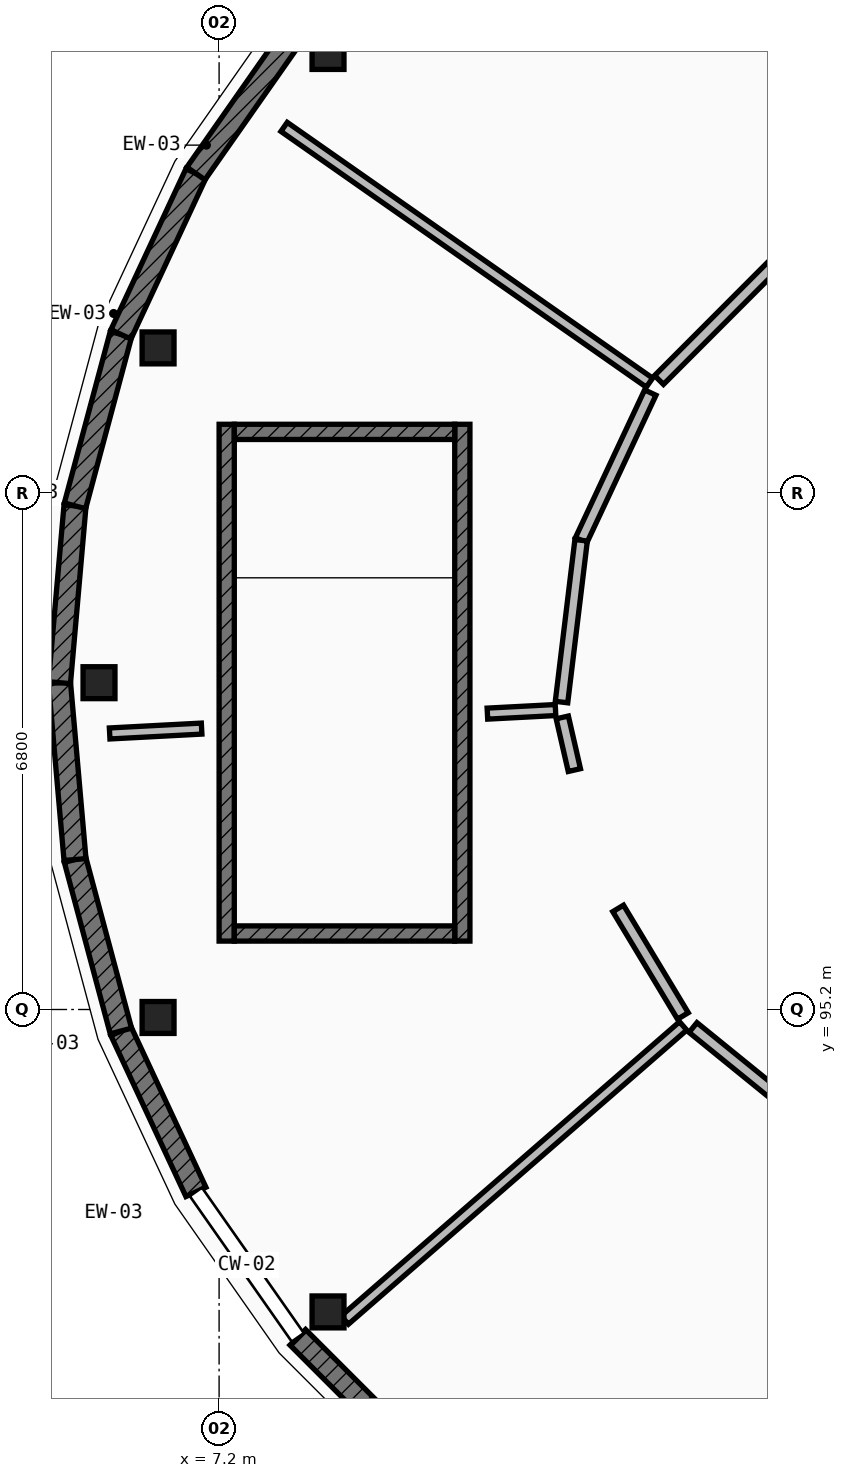
"""IFC4 building model, lengths in metres.
Left out: names, types, materials, properties, quantities, classifications, styles, units other than length and angle.
Written with IfcOpenShell. Run it as: python <this file> out.ifc"""

import sys

from ifc_helpers import new_model, si_unit, direction, frame, frame_2d, origin, origin_2d, place, context, subcontext, project, spatial, rectangle, extrude, element, fill, save


model = new_model("IFC4")
c1 = context("Model", 3, precision=1e-05, world=origin(), true_north=direction((0.0, 1.0)))
c2 = subcontext(c1, "Body", "Model", "MODEL_VIEW")
j1 = project(units=[si_unit("LENGTHUNIT", "METRE"), si_unit("PLANEANGLEUNIT", "RADIAN")], contexts=[c1])
p1 = place(None, origin())
s1 = spatial("IfcSite", under=j1, at=p1, CompositionType="ELEMENT")
p2 = place(p1, origin())
s2 = spatial("IfcBuilding", under=s1, at=p2, CompositionType="ELEMENT")
p3 = place(p2, frame((0.0, 0.0, 4.55)))
s3 = spatial("IfcBuildingStorey", under=s2, at=p3, CompositionType="ELEMENT", Elevation=4.55)
for number, where, z_axis, x_axis in (
    (1, (8.633, 107.779, 0.0), (0.0, 0.0, 1.0), (1.0, 0.0, 0.0)),
    (2, (6.397, 103.905, 0.0), (0.0, 0.0, 1.0), (1.0, 0.0, 0.0)),
    (3, (5.62, 99.5, 0.0), (0.0, 0.0, 1.0), (1.0, 0.0, 0.0)),
    (4, (6.397, 95.095, 0.0), (0.0, 0.0, 1.0), (1.0, 0.0, 0.0)),
    (5, (8.633, 91.221, 0.0), (0.0, 0.0, 1.0), (1.0, 0.0, 0.0)),
):
    element("IfcColumn", number, at=place(p3, frame(where, z_axis=z_axis, x_axis=x_axis)), inside=s3, PredefinedType="COLUMN", context=c2, shape_type="SweptSolid", body=[
        extrude(rectangle(XDim=0.42, YDim=0.42, at=origin_2d()), origin(), (0.0, 0.0, 1.0), 4.2),
    ])
p4 = place(p3, frame((9.887, 89.235, 0.0), z_axis=(0.0, 0.0, 1.0), x_axis=(-0.707106781187, 0.707106781187, 0.0)))
e6 = element("IfcWall", 6, at=p4, inside=s3, PredefinedType="ELEMENTEDWALL", context=c2, shape_type="SweptSolid", body=[
    extrude(rectangle(XDim=2.336, YDim=0.29, at=frame_2d((1.168, 0.0))), origin(), (0.0, 0.0, 1.0), 3.309),
])
p5 = place(p4, frame((0.528, 0.0, 0.85)))
e7 = element("IfcOpeningElement", 7, at=p5, cuts=e6, PredefinedType="OPENING", context=c2, shape_type="SweptSolid", body=[
    extrude(rectangle(XDim=1.28, YDim=1.65, at=frame_2d((0.64, 0.825))), frame((0.0, 0.155, 0.0), z_axis=(0.0, -1.0, 0.0), x_axis=(1.0, 0.0, 0.0)), (0.0, 0.0, 1.0), 0.31),
])
p6 = place(p3, frame((6.895, 92.8, 0.0), z_axis=(0.0, 0.0, 1.0), x_axis=(-0.422587894318, 0.906321946979, 0.0)))
e8 = element("IfcWall", 8, at=p6, inside=s3, PredefinedType="ELEMENTEDWALL", context=c2, shape_type="SweptSolid", body=[
    extrude(rectangle(XDim=2.336, YDim=0.29, at=frame_2d((1.168, 0.0))), origin(), (0.0, 0.0, 1.0), 3.309),
])
p7 = place(p6, frame((0.518, 0.0, 0.85)))
e9 = element("IfcOpeningElement", 9, at=p7, cuts=e8, PredefinedType="OPENING", context=c2, shape_type="SweptSolid", body=[
    extrude(rectangle(XDim=1.3, YDim=1.4, at=frame_2d((0.65, 0.7))), frame((0.0, 0.155, 0.0), z_axis=(0.0, -1.0, 0.0), x_axis=(1.0, 0.0, 0.0)), (0.0, 0.0, 1.0), 0.31),
])
p8 = place(p3, frame((5.908, 94.917, 0.0), z_axis=(0.0, 0.0, 1.0), x_axis=(-0.258612423585, 0.965981166673, 0.0)))
e10 = element("IfcWall", 10, at=p8, inside=s3, PredefinedType="ELEMENTEDWALL", context=c2, shape_type="SweptSolid", body=[
    extrude(rectangle(XDim=2.335, YDim=0.29, at=frame_2d((1.168, 0.0))), origin(), (0.0, 0.0, 1.0), 3.309),
])
p9 = place(p8, frame((0.518, 0.0, 0.85)))
e11 = element("IfcOpeningElement", 11, at=p9, cuts=e10, PredefinedType="OPENING", context=c2, shape_type="SweptSolid", body=[
    extrude(rectangle(XDim=1.3, YDim=1.7, at=frame_2d((0.65, 0.85))), frame((0.0, 0.155, 0.0), z_axis=(0.0, -1.0, 0.0), x_axis=(1.0, 0.0, 0.0)), (0.0, 0.0, 1.0), 0.31),
])
for number, where, z_axis, x_axis in (
    (12, (5.304, 97.173, 0.0), (0.0, 0.0, 1.0), (-0.087, 0.996, 0.0)),
    (13, (5.1, 99.5, 0.0), (0.0, 0.0, 1.0), (0.087, 0.996, 0.0)),
):
    element("IfcWall", number, at=place(p3, frame(where, z_axis=z_axis, x_axis=x_axis)), inside=s3, PredefinedType="ELEMENTEDWALL", context=c2, shape_type="SweptSolid", body=[
        extrude(rectangle(XDim=2.336, YDim=0.29, at=frame_2d((1.168, 0.0))), origin(), (0.0, 0.0, 1.0), 3.309),
    ])
p10 = place(p3, frame((5.304, 101.827, 0.0), z_axis=(0.0, 0.0, 1.0), x_axis=(0.258612423585, 0.965981166673, 0.0)))
e14 = element("IfcWall", 14, at=p10, inside=s3, PredefinedType="ELEMENTEDWALL", context=c2, shape_type="SweptSolid", body=[
    extrude(rectangle(XDim=2.335, YDim=0.29, at=frame_2d((1.168, 0.0))), origin(), (0.0, 0.0, 1.0), 3.309),
])
p11 = place(p10, frame((0.518, 0.0, 0.85)))
e15 = element("IfcOpeningElement", 15, at=p11, cuts=e14, PredefinedType="OPENING", context=c2, shape_type="SweptSolid", body=[
    extrude(rectangle(XDim=1.3, YDim=2.0, at=frame_2d((0.65, 1.0))), frame((0.0, 0.155, 0.0), z_axis=(0.0, -1.0, 0.0), x_axis=(1.0, 0.0, 0.0)), (0.0, 0.0, 1.0), 0.31),
])
p12 = place(p3, frame((5.908, 104.083, 0.0), z_axis=(0.0, 0.0, 1.0), x_axis=(0.422587894318, 0.906321946979, 0.0)))
e16 = element("IfcWall", 16, at=p12, inside=s3, PredefinedType="ELEMENTEDWALL", context=c2, shape_type="SweptSolid", body=[
    extrude(rectangle(XDim=2.336, YDim=0.29, at=frame_2d((1.168, 0.0))), origin(), (0.0, 0.0, 1.0), 3.309),
])
p13 = place(p12, frame((0.518, 0.0, 0.7)))
e17 = element("IfcOpeningElement", 17, at=p13, cuts=e16, PredefinedType="OPENING", context=c2, shape_type="SweptSolid", body=[
    extrude(rectangle(XDim=1.3, YDim=2.3, at=frame_2d((0.65, 1.15))), frame((0.0, 0.155, 0.0), z_axis=(0.0, -1.0, 0.0), x_axis=(1.0, 0.0, 0.0)), (0.0, 0.0, 1.0), 0.31),
])
p14 = place(p3, frame((6.895, 106.2, 0.0), z_axis=(0.0, 0.0, 1.0), x_axis=(0.573728883722, 0.819045278347, 0.0)))
e18 = element("IfcWall", 18, at=p14, inside=s3, PredefinedType="ELEMENTEDWALL", context=c2, shape_type="SweptSolid", body=[
    extrude(rectangle(XDim=2.336, YDim=0.29, at=frame_2d((1.168, 0.0))), origin(), (0.0, 0.0, 1.0), 3.309),
])
p15 = place(p14, frame((0.508, 0.0, 0.85)))
e19 = element("IfcOpeningElement", 19, at=p15, cuts=e18, PredefinedType="OPENING", context=c2, shape_type="SweptSolid", body=[
    extrude(rectangle(XDim=1.32, YDim=1.55, at=frame_2d((0.66, 0.775))), frame((0.0, 0.155, 0.0), z_axis=(0.0, -1.0, 0.0), x_axis=(1.0, 0.0, 0.0)), (0.0, 0.0, 1.0), 0.31),
])
p16 = place(p3, frame((10.4, 96.1, 0.0), z_axis=(0.0, 0.0, 1.0), x_axis=(0.0, 1.0, 0.0)))
e20 = element("IfcWall", 20, at=p16, inside=s3, PredefinedType="SHEAR", context=c2, shape_type="SweptSolid", body=[
    extrude(rectangle(XDim=6.8, YDim=0.2, at=frame_2d((3.4, 0.0))), origin(), (0.0, 0.0, 1.0), 3.955),
])
p17 = place(p16, frame((0.38, 0.0, 0.0)))
e21 = element("IfcOpeningElement", 21, at=p17, cuts=e20, PredefinedType="OPENING", context=c2, shape_type="SweptSolid", body=[
    extrude(rectangle(XDim=1.05, YDim=2.15, at=frame_2d((0.525, 1.075))), frame((0.0, 0.11, 0.0), z_axis=(0.0, -1.0, 0.0), x_axis=(1.0, 0.0, 0.0)), (0.0, 0.0, 1.0), 0.22),
])
p18 = place(p3, frame((7.3, 96.1, 0.0), z_axis=(0.0, 0.0, 1.0), x_axis=(0.0, 1.0, 0.0)))
e22 = element("IfcWall", 22, at=p18, inside=s3, PredefinedType="SHEAR", context=c2, shape_type="SweptSolid", body=[
    extrude(rectangle(XDim=6.8, YDim=0.2, at=frame_2d((3.4, 0.0))), origin(), (0.0, 0.0, 1.0), 3.955),
])
for number, where, z_axis, x_axis in (
    (23, (10.3, 96.2, 0.0), (0.0, 0.0, 1.0), (-1.0, 0.0, 0.0)),
    (24, (10.3, 102.8, 0.0), (0.0, 0.0, 1.0), (-1.0, 0.0, 0.0)),
):
    element("IfcWall", number, at=place(p3, frame(where, z_axis=z_axis, x_axis=x_axis)), inside=s3, PredefinedType="SHEAR", context=c2, shape_type="SweptSolid", body=[
        extrude(rectangle(XDim=2.9, YDim=0.2, at=frame_2d((1.45, 0.0))), origin(), (0.0, 0.0, 1.0), 3.955),
    ])
p19 = place(p3, frame((12.862, 103.448, 0.0), z_axis=(0.0, 0.0, 1.0), x_axis=(-0.819231920519, 0.573462344363, 0.0)))
e25 = element("IfcWall", 25, at=p19, inside=s3, PredefinedType="PARTITIONING", context=c2, shape_type="SweptSolid", body=[
    extrude(rectangle(XDim=5.868, YDim=0.145, at=frame_2d((2.934, 0.0))), origin(), (0.0, 0.0, 1.0), 3.284),
])
p20 = place(p3, frame((11.626, 99.14, 0.0), z_axis=(0.0, 0.0, 1.0), x_axis=(-0.998634316819, -0.052244629109, 0.0)))
e26 = element("IfcWall", 26, at=p20, inside=s3, PredefinedType="PARTITIONING", context=c2, shape_type="SweptSolid", body=[
    extrude(rectangle(XDim=0.897, YDim=0.145, at=frame_2d((0.449, 0.0))), origin(), (0.0, 0.0, 1.0), 3.284),
])
p21 = place(p3, frame((6.97, 98.896, 0.0), z_axis=(0.0, 0.0, 1.0), x_axis=(-0.998605556721, -0.05279149634, 0.0)))
e27 = element("IfcWall", 27, at=p21, inside=s3, PredefinedType="PARTITIONING", context=c2, shape_type="SweptSolid", body=[
    extrude(rectangle(XDim=1.212, YDim=0.145, at=frame_2d((0.606, 0.0))), origin(), (0.0, 0.0, 1.0), 3.284),
])
p22 = place(p3, frame((13.305, 94.984, 0.0), z_axis=(0.0, 0.0, 1.0), x_axis=(-0.754647404393, -0.656130547256, 0.0)))
e28 = element("IfcWall", 28, at=p22, inside=s3, PredefinedType="PARTITIONING", context=c2, shape_type="SweptSolid", body=[
    extrude(rectangle(XDim=5.898, YDim=0.145, at=frame_2d((2.949, 0.0))), origin(), (0.0, 0.0, 1.0), 3.284),
])
p23 = place(p3, frame((14.503, 105.001, 0.0), z_axis=(0.0, 0.0, 1.0), x_axis=(-0.706366445294, -0.707846342762, 0.0)))
e29 = element("IfcWall", 29, at=p23, inside=s3, PredefinedType="PARTITIONING", context=c2, shape_type="SweptSolid", body=[
    extrude(rectangle(XDim=2.145, YDim=0.165, at=frame_2d((1.072, 0.0))), origin(), (0.0, 0.0, 1.0), 3.284),
])
p24 = place(p23, frame((0.588, 0.0, 0.0)))
e30 = element("IfcOpeningElement", 30, at=p24, cuts=e29, PredefinedType="OPENING", context=c2, shape_type="SweptSolid", body=[
    extrude(rectangle(XDim=0.97, YDim=2.2, at=frame_2d((0.485, 1.1))), frame((0.0, 0.093, 0.0), z_axis=(0.0, -1.0, 0.0), x_axis=(1.0, 0.0, 0.0)), (0.0, 0.0, 1.0), 0.185),
])
p25 = place(p3, frame((12.873, 103.317, 0.0), z_axis=(0.0, 0.0, 1.0), x_axis=(-0.424218123239, -0.905560038824, 0.0)))
e31 = element("IfcWall", 31, at=p25, inside=s3, PredefinedType="PARTITIONING", context=c2, shape_type="SweptSolid", body=[
    extrude(rectangle(XDim=2.146, YDim=0.165, at=frame_2d((1.073, 0.0))), origin(), (0.0, 0.0, 1.0), 3.284),
])
p26 = place(p25, frame((0.578, 0.0, 0.0)))
e32 = element("IfcOpeningElement", 32, at=p26, cuts=e31, PredefinedType="OPENING", context=c2, shape_type="SweptSolid", body=[
    extrude(rectangle(XDim=0.99, YDim=2.22, at=frame_2d((0.495, 1.11))), frame((0.0, 0.093, 0.0), z_axis=(0.0, -1.0, 0.0), x_axis=(1.0, 0.0, 0.0)), (0.0, 0.0, 1.0), 0.185),
])
p27 = place(p3, frame((11.963, 101.374, 0.0), z_axis=(0.0, 0.0, 1.0), x_axis=(-0.120222568092, -0.992746963794, 0.0)))
e33 = element("IfcWall", 33, at=p27, inside=s3, PredefinedType="PARTITIONING", context=c2, shape_type="SweptSolid", body=[
    extrude(rectangle(XDim=2.145, YDim=0.165, at=frame_2d((1.072, 0.0))), origin(), (0.0, 0.0, 1.0), 3.284),
])
p28 = place(p3, frame((11.715, 99.043, 0.0), z_axis=(0.0, 0.0, 1.0), x_axis=(0.223580091663, -0.974685560892, 0.0)))
e34 = element("IfcWall", 34, at=p28, inside=s3, PredefinedType="PARTITIONING", context=c2, shape_type="SweptSolid", body=[
    extrude(rectangle(XDim=0.711, YDim=0.165, at=frame_2d((0.355, 0.0))), origin(), (0.0, 0.0, 1.0), 3.284),
])
p29 = place(p3, frame((12.45, 96.53, 0.0), z_axis=(0.0, 0.0, 1.0), x_axis=(0.515842762515, -0.856683281243, 0.0)))
e35 = element("IfcWall", 35, at=p29, inside=s3, PredefinedType="PARTITIONING", context=c2, shape_type="SweptSolid", body=[
    extrude(rectangle(XDim=1.652, YDim=0.165, at=frame_2d((0.826, 0.0))), origin(), (0.0, 0.0, 1.0), 3.284),
])
p30 = place(p29, frame((0.321, 0.0, 0.0)))
e36 = element("IfcOpeningElement", 36, at=p30, cuts=e35, PredefinedType="OPENING", context=c2, shape_type="SweptSolid", body=[
    extrude(rectangle(XDim=1.01, YDim=2.15, at=frame_2d((0.505, 1.075))), frame((0.0, 0.093, 0.0), z_axis=(0.0, -1.0, 0.0), x_axis=(1.0, 0.0, 0.0)), (0.0, 0.0, 1.0), 0.185),
])
p31 = place(p3, frame((13.435, 94.963, 0.0), z_axis=(0.0, 0.0, 1.0), x_axis=(0.776454505021, -0.63017331079, 0.0)))
e37 = element("IfcWall", 37, at=p31, inside=s3, PredefinedType="PARTITIONING", context=c2, shape_type="SweptSolid", body=[
    extrude(rectangle(XDim=1.929, YDim=0.165, at=frame_2d((0.965, 0.0))), origin(), (0.0, 0.0, 1.0), 3.284),
])
p32 = place(p31, frame((0.45, 0.0, 0.0)))
e38 = element("IfcOpeningElement", 38, at=p32, cuts=e37, PredefinedType="OPENING", context=c2, shape_type="SweptSolid", body=[
    extrude(rectangle(XDim=1.03, YDim=2.18, at=frame_2d((0.515, 1.09))), frame((0.0, 0.093, 0.0), z_axis=(0.0, -1.0, 0.0), x_axis=(1.0, 0.0, 0.0)), (0.0, 0.0, 1.0), 0.185),
])
p33 = place(p5, origin())
e39 = element("IfcWindow", 39, at=p33, inside=s3, PartitioningType="SINGLE_PANEL", PredefinedType="WINDOW", context=c2, shape_type="SweptSolid", body=[
    extrude(rectangle(XDim=1.28, YDim=1.65, at=frame_2d((0.64, 0.825))), frame((0.0, 0.03, 0.0), z_axis=(0.0, -1.0, 0.0), x_axis=(1.0, 0.0, 0.0)), (0.0, 0.0, 1.0), 0.06),
])
fill(e7, e39)
p34 = place(p7, origin())
e40 = element("IfcWindow", 40, at=p34, inside=s3, PartitioningType="SINGLE_PANEL", PredefinedType="WINDOW", context=c2, shape_type="SweptSolid", body=[
    extrude(rectangle(XDim=1.3, YDim=1.4, at=frame_2d((0.65, 0.7))), frame((0.0, 0.03, 0.0), z_axis=(0.0, -1.0, 0.0), x_axis=(1.0, 0.0, 0.0)), (0.0, 0.0, 1.0), 0.06),
])
fill(e9, e40)
p35 = place(p9, origin())
e41 = element("IfcWindow", 41, at=p35, inside=s3, PartitioningType="SINGLE_PANEL", PredefinedType="WINDOW", context=c2, shape_type="SweptSolid", body=[
    extrude(rectangle(XDim=1.3, YDim=1.7, at=frame_2d((0.65, 0.85))), frame((0.0, 0.03, 0.0), z_axis=(0.0, -1.0, 0.0), x_axis=(1.0, 0.0, 0.0)), (0.0, 0.0, 1.0), 0.06),
])
fill(e11, e41)
p36 = place(p11, origin())
e42 = element("IfcWindow", 42, at=p36, inside=s3, PartitioningType="SINGLE_PANEL", PredefinedType="WINDOW", context=c2, shape_type="SweptSolid", body=[
    extrude(rectangle(XDim=1.3, YDim=2.0, at=frame_2d((0.65, 1.0))), frame((0.0, 0.03, 0.0), z_axis=(0.0, -1.0, 0.0), x_axis=(1.0, 0.0, 0.0)), (0.0, 0.0, 1.0), 0.06),
])
fill(e15, e42)
p37 = place(p13, origin())
e43 = element("IfcWindow", 43, at=p37, inside=s3, PartitioningType="SINGLE_PANEL", PredefinedType="WINDOW", context=c2, shape_type="SweptSolid", body=[
    extrude(rectangle(XDim=1.3, YDim=2.3, at=frame_2d((0.65, 1.15))), frame((0.0, 0.03, 0.0), z_axis=(0.0, -1.0, 0.0), x_axis=(1.0, 0.0, 0.0)), (0.0, 0.0, 1.0), 0.06),
])
fill(e17, e43)
p38 = place(p15, origin())
e44 = element("IfcWindow", 44, at=p38, inside=s3, PartitioningType="SINGLE_PANEL", PredefinedType="WINDOW", context=c2, shape_type="SweptSolid", body=[
    extrude(rectangle(XDim=1.32, YDim=1.55, at=frame_2d((0.66, 0.775))), frame((0.0, 0.03, 0.0), z_axis=(0.0, -1.0, 0.0), x_axis=(1.0, 0.0, 0.0)), (0.0, 0.0, 1.0), 0.06),
])
fill(e19, e44)
p39 = place(p17, origin())
e45 = element("IfcDoor", 45, at=p39, inside=s3, OperationType="SINGLE_SWING_RIGHT", PredefinedType="DOOR", context=c2, shape_type="SweptSolid", body=[
    extrude(rectangle(XDim=1.05, YDim=2.15, at=frame_2d((0.525, 1.075))), frame((0.0, 0.025, 0.0), z_axis=(0.0, -1.0, 0.0), x_axis=(1.0, 0.0, 0.0)), (0.0, 0.0, 1.0), 0.05),
])
fill(e21, e45)
p40 = place(p24, origin())
e46 = element("IfcDoor", 46, at=p40, inside=s3, OperationType="SINGLE_SWING_LEFT", PredefinedType="DOOR", context=c2, shape_type="SweptSolid", body=[
    extrude(rectangle(XDim=0.97, YDim=2.2, at=frame_2d((0.485, 1.1))), frame((0.0, 0.025, 0.0), z_axis=(0.0, -1.0, 0.0), x_axis=(1.0, 0.0, 0.0)), (0.0, 0.0, 1.0), 0.05),
])
fill(e30, e46)
p41 = place(p26, origin())
e47 = element("IfcDoor", 47, at=p41, inside=s3, OperationType="SINGLE_SWING_RIGHT", PredefinedType="DOOR", context=c2, shape_type="SweptSolid", body=[
    extrude(rectangle(XDim=0.99, YDim=2.22, at=frame_2d((0.495, 1.11))), frame((0.0, 0.025, 0.0), z_axis=(0.0, -1.0, 0.0), x_axis=(1.0, 0.0, 0.0)), (0.0, 0.0, 1.0), 0.05),
])
fill(e32, e47)
p42 = place(p30, origin())
e48 = element("IfcDoor", 48, at=p42, inside=s3, OperationType="SINGLE_SWING_LEFT", PredefinedType="DOOR", context=c2, shape_type="SweptSolid", body=[
    extrude(rectangle(XDim=1.01, YDim=2.15, at=frame_2d((0.505, 1.075))), frame((0.0, 0.025, 0.0), z_axis=(0.0, -1.0, 0.0), x_axis=(1.0, 0.0, 0.0)), (0.0, 0.0, 1.0), 0.05),
])
fill(e36, e48)
p43 = place(p32, origin())
e49 = element("IfcDoor", 49, at=p43, inside=s3, OperationType="SINGLE_SWING_RIGHT", PredefinedType="DOOR", context=c2, shape_type="SweptSolid", body=[
    extrude(rectangle(XDim=1.03, YDim=2.18, at=frame_2d((0.515, 1.09))), frame((0.0, 0.025, 0.0), z_axis=(0.0, -1.0, 0.0), x_axis=(1.0, 0.0, 0.0)), (0.0, 0.0, 1.0), 0.05),
])
fill(e38, e49)
save(model, sys.argv[1])
